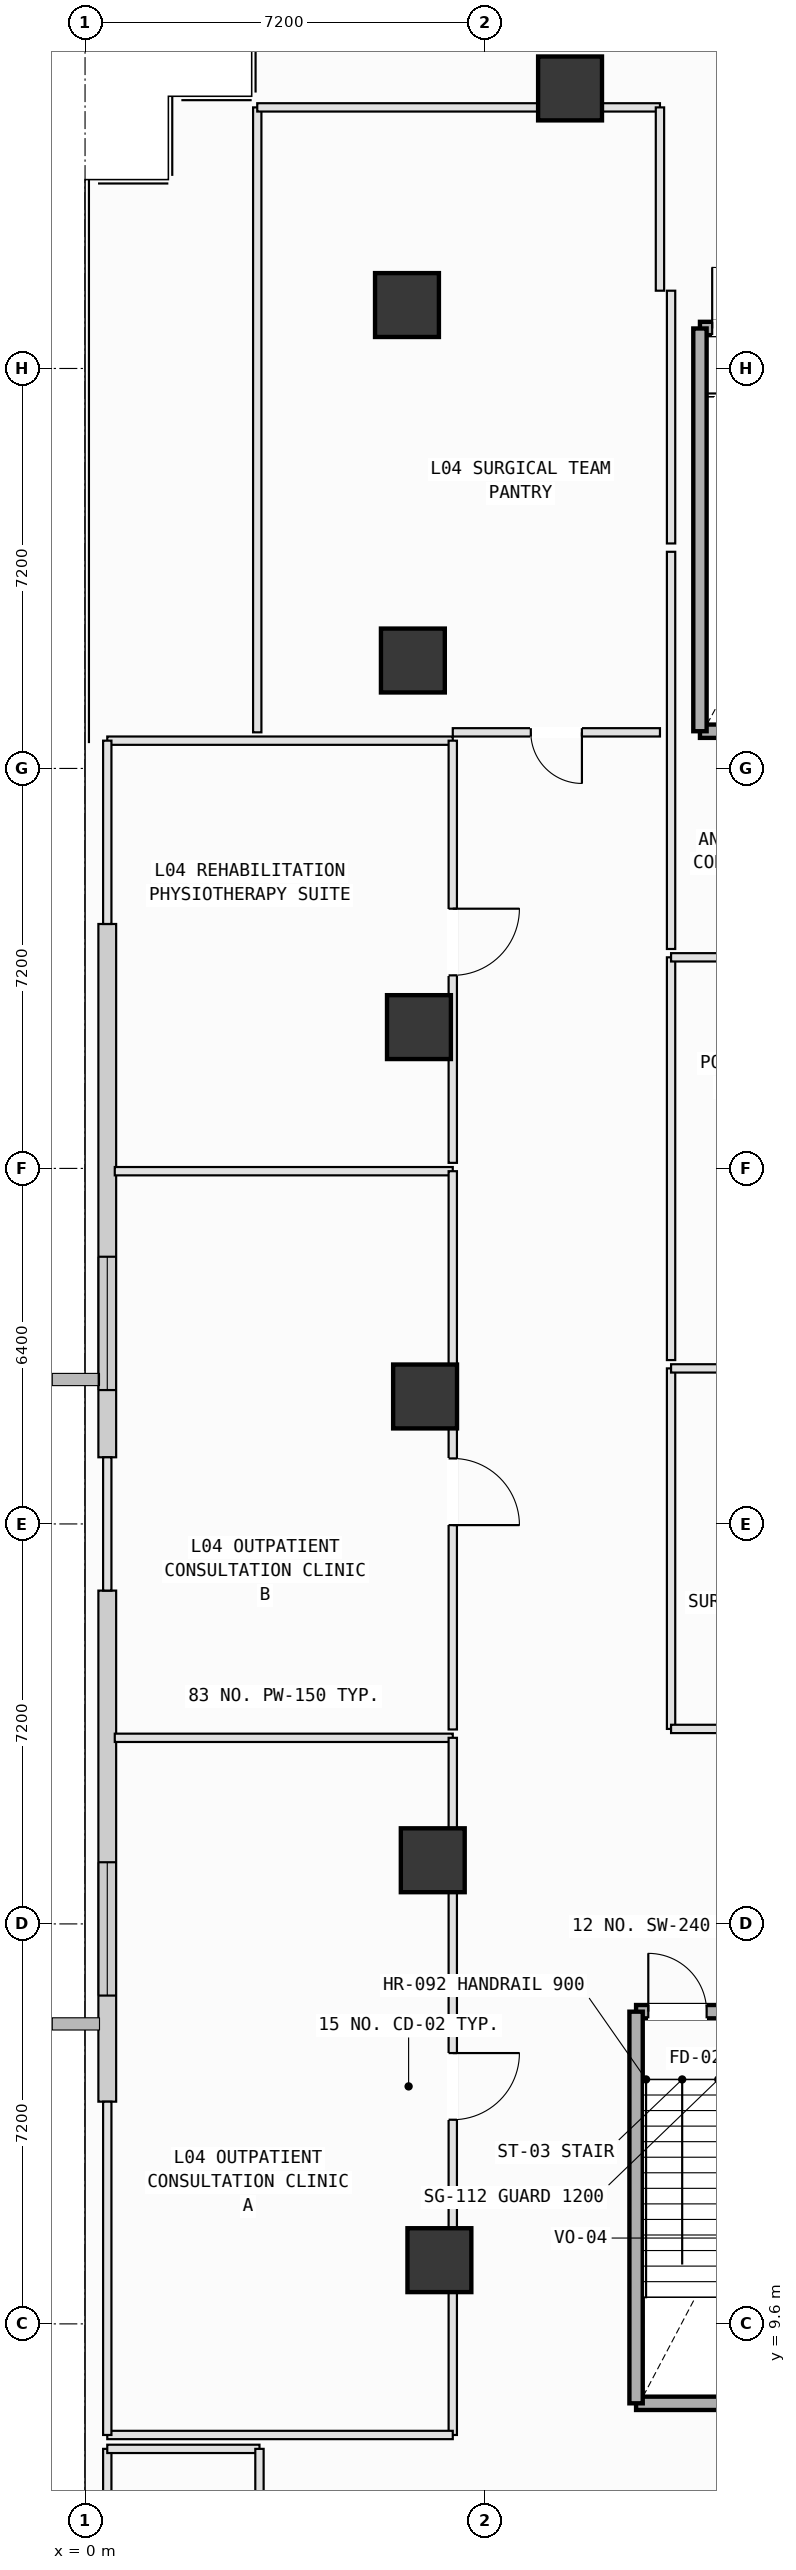
"""IFC4 building model, lengths in metres.
Left out: names, types, materials, properties, quantities, classifications, styles, units other than length and angle.
Written with IfcOpenShell. Run it as: python <this file> out.ifc"""

import sys

from ifc_helpers import new_model, si_unit, direction, frame, frame_2d, origin, origin_2d, place, context, subcontext, project, spatial, rectangle, extrude, element, fill, save


model = new_model("IFC4")
c1 = context("Model", 3, precision=1e-05, world=origin(), true_north=direction((0.0, 1.0)))
c2 = subcontext(c1, "Body", "Model", "MODEL_VIEW")
j1 = project(units=[si_unit("LENGTHUNIT", "METRE"), si_unit("PLANEANGLEUNIT", "RADIAN")], contexts=[c1])
p1 = place(None, origin())
s1 = spatial("IfcSite", under=j1, at=p1, CompositionType="ELEMENT")
p2 = place(p1, origin())
s2 = spatial("IfcBuilding", under=s1, at=p2, CompositionType="ELEMENT")
p3 = place(p2, frame((0.0, 0.0, 21.6)))
s3 = spatial("IfcBuildingStorey", under=s2, at=p3, CompositionType="ELEMENT", Elevation=21.6)
for number, where, z_axis, x_axis in (
    (1, (8.731, 49.841, 0.0), (0.0, 0.0, 1.0), (1.0, 0.0, 0.0)),
    (2, (5.796, 45.942, 0.0), (0.0, 0.0, 1.0), (1.0, 0.0, 0.0)),
    (3, (5.902, 39.543, 0.0), (0.0, 0.0, 1.0), (1.0, 0.0, 0.0)),
    (4, (6.011, 32.944, 0.0), (0.0, 0.0, 1.0), (1.0, 0.0, 0.0)),
    (5, (6.121, 26.295, 0.0), (0.0, 0.0, 1.0), (1.0, 0.0, 0.0)),
    (6, (6.26, 17.946, 0.0), (0.0, 0.0, 1.0), (1.0, 0.0, 0.0)),
    (7, (6.379, 10.747, 0.0), (0.0, 0.0, 1.0), (1.0, 0.0, 0.0)),
):
    element("IfcColumn", number, at=place(p3, frame(where, z_axis=z_axis, x_axis=x_axis)), inside=s3, PredefinedType="COLUMN", context=c2, shape_type="SweptSolid", body=[
        extrude(rectangle(XDim=1.15, YDim=1.15, at=origin_2d()), origin(), (0.0, 0.0, 1.0), 5.4),
    ])
p4 = place(p3, frame((0.4, 13.6, 0.0), z_axis=(0.0, 0.0, 1.0), x_axis=(0.0, 1.0, 0.0)))
e8 = element("IfcWall", 8, at=p4, inside=s3, PredefinedType="SOLIDWALL", context=c2, shape_type="SweptSolid", body=[
    extrude(rectangle(XDim=9.2, YDim=0.32, at=frame_2d((4.6, 0.0))), origin(), (0.0, 0.0, 1.0), 4.18),
])
p5 = place(p4, frame((1.91, 0.0, 0.8)))
e9 = element("IfcOpeningElement", 9, at=p5, cuts=e8, PredefinedType="OPENING", context=c2, shape_type="SweptSolid", body=[
    extrude(rectangle(XDim=2.4, YDim=2.2, at=frame_2d((1.2, 1.1))), frame((0.0, 0.17, 0.0), z_axis=(0.0, -1.0, 0.0), x_axis=(1.0, 0.0, 0.0)), (0.0, 0.0, 1.0), 0.34),
])
p6 = place(p3, frame((0.4, 25.2, 0.0), z_axis=(0.0, 0.0, 1.0), x_axis=(0.0, 1.0, 0.0)))
e10 = element("IfcWall", 10, at=p6, inside=s3, PredefinedType="SOLIDWALL", context=c2, shape_type="SweptSolid", body=[
    extrude(rectangle(XDim=9.6, YDim=0.32, at=frame_2d((4.8, 0.0))), origin(), (0.0, 0.0, 1.0), 4.18),
])
p7 = place(p6, frame((1.21, 0.0, 0.8)))
e11 = element("IfcOpeningElement", 11, at=p7, cuts=e10, PredefinedType="OPENING", context=c2, shape_type="SweptSolid", body=[
    extrude(rectangle(XDim=2.4, YDim=2.2, at=frame_2d((1.2, 1.1))), frame((0.0, 0.17, 0.0), z_axis=(0.0, -1.0, 0.0), x_axis=(1.0, 0.0, 0.0)), (0.0, 0.0, 1.0), 0.34),
])
p8 = place(p3, frame((9.92, 15.22, 0.0), z_axis=(0.0, 0.0, 1.0), x_axis=(1.0, 0.0, 0.0)))
e12 = element("IfcWall", 12, at=p8, inside=s3, PredefinedType="SOLIDWALL", context=c2, shape_type="SweptSolid", body=[
    extrude(rectangle(XDim=3.26, YDim=0.24, at=frame_2d((1.63, 0.0))), origin(), (0.0, 0.0, 1.0), 5.1),
])
p9 = place(p8, frame((0.22, 0.0, 0.0)))
e13 = element("IfcOpeningElement", 13, at=p9, cuts=e12, PredefinedType="OPENING", context=c2, shape_type="SweptSolid", body=[
    extrude(rectangle(XDim=1.05, YDim=2.15, at=frame_2d((0.525, 1.075))), frame((0.0, 0.13, 0.0), z_axis=(0.0, -1.0, 0.0), x_axis=(1.0, 0.0, 0.0)), (0.0, 0.0, 1.0), 0.26),
])
p10 = place(p3, frame((13.18, 8.17, 0.0), z_axis=(0.0, 0.0, 1.0), x_axis=(-1.0, 0.0, 0.0)))
e14 = element("IfcWall", 14, at=p10, inside=s3, PredefinedType="SOLIDWALL", context=c2, shape_type="SweptSolid", body=[
    extrude(rectangle(XDim=3.26, YDim=0.24, at=frame_2d((1.63, 0.0))), origin(), (0.0, 0.0, 1.0), 5.1),
])
p11 = place(p3, frame((9.92, 8.17, 0.0), z_axis=(0.0, 0.0, 1.0), x_axis=(0.0, 1.0, 0.0)))
e15 = element("IfcWall", 15, at=p11, inside=s3, PredefinedType="SOLIDWALL", context=c2, shape_type="SweptSolid", body=[
    extrude(rectangle(XDim=7.05, YDim=0.24, at=frame_2d((3.525, 0.0))), origin(), (0.0, 0.0, 1.0), 5.1),
])
p12 = place(p3, frame((11.07, 45.52, 0.0), z_axis=(0.0, 0.0, 1.0), x_axis=(1.0, 0.0, 0.0)))
e16 = element("IfcWall", 16, at=p12, inside=s3, PredefinedType="SOLIDWALL", context=c2, shape_type="SweptSolid", body=[
    extrude(rectangle(XDim=3.46, YDim=0.24, at=frame_2d((1.73, 0.0))), origin(), (0.0, 0.0, 1.0), 5.1),
])
p13 = place(p12, frame((0.22, 0.0, 0.0)))
e17 = element("IfcOpeningElement", 17, at=p13, cuts=e16, PredefinedType="OPENING", context=c2, shape_type="SweptSolid", body=[
    extrude(rectangle(XDim=1.1, YDim=2.15, at=frame_2d((0.55, 1.075))), frame((0.0, 0.13, 0.0), z_axis=(0.0, -1.0, 0.0), x_axis=(1.0, 0.0, 0.0)), (0.0, 0.0, 1.0), 0.26),
])
p14 = place(p3, frame((14.53, 38.27, 0.0), z_axis=(0.0, 0.0, 1.0), x_axis=(-1.0, 0.0, 0.0)))
e18 = element("IfcWall", 18, at=p14, inside=s3, PredefinedType="SOLIDWALL", context=c2, shape_type="SweptSolid", body=[
    extrude(rectangle(XDim=3.46, YDim=0.24, at=frame_2d((1.73, 0.0))), origin(), (0.0, 0.0, 1.0), 5.1),
])
p15 = place(p3, frame((11.07, 38.27, 0.0), z_axis=(0.0, 0.0, 1.0), x_axis=(0.0, 1.0, 0.0)))
e19 = element("IfcWall", 19, at=p15, inside=s3, PredefinedType="SOLIDWALL", context=c2, shape_type="SweptSolid", body=[
    extrude(rectangle(XDim=7.25, YDim=0.24, at=frame_2d((3.625, 0.0))), origin(), (0.0, 0.0, 1.0), 5.1),
])
p16 = place(p3, frame((0.535, 20.15, 0.0), z_axis=(0.0, 0.0, 1.0), x_axis=(1.0, 0.0, 0.0)))
e20 = element("IfcWall", 20, at=p16, inside=s3, PredefinedType="PARTITIONING", context=c2, shape_type="SweptSolid", body=[
    extrude(rectangle(XDim=6.085, YDim=0.15, at=frame_2d((3.042, 0.0))), origin(), (0.0, 0.0, 1.0), 5.1),
])
p17 = place(p3, frame((6.62, 20.15, 0.0), z_axis=(0.0, 0.0, 1.0), x_axis=(0.0, -1.0, 0.0)))
e21 = element("IfcWall", 21, at=p17, inside=s3, PredefinedType="PARTITIONING", context=c2, shape_type="SweptSolid", body=[
    extrude(rectangle(XDim=12.55, YDim=0.15, at=frame_2d((6.275, 0.0))), origin(), (0.0, 0.0, 1.0), 2.685),
])
p18 = place(p17, frame((5.675, 0.0, 0.0)))
e22 = element("IfcOpeningElement", 22, at=p18, cuts=e21, PredefinedType="OPENING", context=c2, shape_type="SweptSolid", body=[
    extrude(rectangle(XDim=1.2, YDim=2.15, at=frame_2d((0.6, 1.075))), frame((0.0, 0.085, 0.0), z_axis=(0.0, -1.0, 0.0), x_axis=(1.0, 0.0, 0.0)), (0.0, 0.0, 1.0), 0.17),
])
p19 = place(p3, frame((6.62, 7.6, 0.0), z_axis=(0.0, 0.0, 1.0), x_axis=(-1.0, 0.0, 0.0)))
e23 = element("IfcWall", 23, at=p19, inside=s3, PredefinedType="PARTITIONING", context=c2, shape_type="SweptSolid", body=[
    extrude(rectangle(XDim=6.22, YDim=0.15, at=frame_2d((3.11, 0.0))), origin(), (0.0, 0.0, 1.0), 5.1),
])
p20 = place(p3, frame((0.4, 7.6, 0.0), z_axis=(0.0, 0.0, 1.0), x_axis=(0.0, 1.0, 0.0)))
e24 = element("IfcWall", 24, at=p20, inside=s3, PredefinedType="PARTITIONING", context=c2, shape_type="SweptSolid", body=[
    extrude(rectangle(XDim=6.0, YDim=0.15, at=frame_2d((3.0, 0.0))), origin(), (0.0, 0.0, 1.0), 5.1),
])
p21 = place(p3, frame((0.535, 30.35, 0.0), z_axis=(0.0, 0.0, 1.0), x_axis=(1.0, 0.0, 0.0)))
e25 = element("IfcWall", 25, at=p21, inside=s3, PredefinedType="PARTITIONING", context=c2, shape_type="SweptSolid", body=[
    extrude(rectangle(XDim=6.085, YDim=0.15, at=frame_2d((3.042, 0.0))), origin(), (0.0, 0.0, 1.0), 5.1),
])
p22 = place(p3, frame((6.62, 30.35, 0.0), z_axis=(0.0, 0.0, 1.0), x_axis=(0.0, -1.0, 0.0)))
e26 = element("IfcWall", 26, at=p22, inside=s3, PredefinedType="PARTITIONING", context=c2, shape_type="SweptSolid", body=[
    extrude(rectangle(XDim=10.05, YDim=0.15, at=frame_2d((5.025, 0.0))), origin(), (0.0, 0.0, 1.0), 2.685),
])
p23 = place(p22, frame((5.171, 0.0, 0.0)))
e27 = element("IfcOpeningElement", 27, at=p23, cuts=e26, PredefinedType="OPENING", context=c2, shape_type="SweptSolid", body=[
    extrude(rectangle(XDim=1.2, YDim=2.15, at=frame_2d((0.6, 1.075))), frame((0.0, 0.085, 0.0), z_axis=(0.0, -1.0, 0.0), x_axis=(1.0, 0.0, 0.0)), (0.0, 0.0, 1.0), 0.17),
])
p24 = place(p3, frame((0.4, 22.8, 0.0), z_axis=(0.0, 0.0, 1.0), x_axis=(0.0, 1.0, 0.0)))
e28 = element("IfcWall", 28, at=p24, inside=s3, PredefinedType="PARTITIONING", context=c2, shape_type="SweptSolid", body=[
    extrude(rectangle(XDim=2.4, YDim=0.15, at=frame_2d((1.2, 0.0))), origin(), (0.0, 0.0, 1.0), 5.1),
])
p25 = place(p3, frame((0.4, 38.1, 0.0), z_axis=(0.0, 0.0, 1.0), x_axis=(1.0, 0.0, 0.0)))
e29 = element("IfcWall", 29, at=p25, inside=s3, PredefinedType="PARTITIONING", context=c2, shape_type="SweptSolid", body=[
    extrude(rectangle(XDim=6.22, YDim=0.15, at=frame_2d((3.11, 0.0))), origin(), (0.0, 0.0, 1.0), 5.1),
])
p26 = place(p3, frame((6.62, 38.1, 0.0), z_axis=(0.0, 0.0, 1.0), x_axis=(0.0, -1.0, 0.0)))
e30 = element("IfcWall", 30, at=p26, inside=s3, PredefinedType="PARTITIONING", context=c2, shape_type="SweptSolid", body=[
    extrude(rectangle(XDim=7.6, YDim=0.15, at=frame_2d((3.8, 0.0))), origin(), (0.0, 0.0, 1.0), 2.685),
])
p27 = place(p26, frame((3.025, 0.0, 0.0)))
e31 = element("IfcOpeningElement", 31, at=p27, cuts=e30, PredefinedType="OPENING", context=c2, shape_type="SweptSolid", body=[
    extrude(rectangle(XDim=1.2, YDim=2.15, at=frame_2d((0.6, 1.075))), frame((0.0, 0.085, 0.0), z_axis=(0.0, -1.0, 0.0), x_axis=(1.0, 0.0, 0.0)), (0.0, 0.0, 1.0), 0.17),
])
p28 = place(p3, frame((0.4, 34.8, 0.0), z_axis=(0.0, 0.0, 1.0), x_axis=(0.0, 1.0, 0.0)))
e32 = element("IfcWall", 32, at=p28, inside=s3, PredefinedType="PARTITIONING", context=c2, shape_type="SweptSolid", body=[
    extrude(rectangle(XDim=3.3, YDim=0.15, at=frame_2d((1.65, 0.0))), origin(), (0.0, 0.0, 1.0), 5.1),
])
p29 = place(p3, frame((0.4, 3.0, 0.0), z_axis=(0.0, 0.0, 1.0), x_axis=(0.0, 1.0, 0.0)))
e33 = element("IfcWall", 33, at=p29, inside=s3, PredefinedType="PARTITIONING", context=c2, shape_type="SweptSolid", body=[
    extrude(rectangle(XDim=4.35, YDim=0.15, at=frame_2d((2.175, 0.0))), origin(), (0.0, 0.0, 1.0), 5.1),
])
p30 = place(p3, frame((0.4, 7.35, 0.0), z_axis=(0.0, 0.0, 1.0), x_axis=(1.0, 0.0, 0.0)))
e34 = element("IfcWall", 34, at=p30, inside=s3, PredefinedType="PARTITIONING", context=c2, shape_type="SweptSolid", body=[
    extrude(rectangle(XDim=2.74, YDim=0.15, at=frame_2d((1.37, 0.0))), origin(), (0.0, 0.0, 1.0), 5.1),
])
p31 = place(p3, frame((3.14, 7.35, 0.0), z_axis=(0.0, 0.0, 1.0), x_axis=(0.0, -1.0, 0.0)))
e35 = element("IfcWall", 35, at=p31, inside=s3, PredefinedType="PARTITIONING", context=c2, shape_type="SweptSolid", body=[
    extrude(rectangle(XDim=2.256, YDim=0.15, at=frame_2d((1.128, 0.0))), origin(), (0.0, 0.0, 1.0), 5.1),
])
p32 = place(p3, frame((10.55, 20.31, 0.0), z_axis=(0.0, 0.0, 1.0), x_axis=(0.0, 1.0, 0.0)))
e36 = element("IfcWall", 36, at=p32, inside=s3, PredefinedType="PARTITIONING", context=c2, shape_type="SweptSolid", body=[
    extrude(rectangle(XDim=6.49, YDim=0.15, at=frame_2d((3.245, 0.0))), origin(), (0.0, 0.0, 1.0), 5.1),
])
for number, where, z_axis, x_axis in (
    (37, (10.55, 26.8, 0.0), (0.0, 0.0, 1.0), (1.0, 0.0, 0.0)),
    (38, (15.14, 20.31, 0.0), (0.0, 0.0, 1.0), (-1.0, 0.0, 0.0)),
):
    element("IfcWall", number, at=place(p3, frame(where, z_axis=z_axis, x_axis=x_axis)), inside=s3, PredefinedType="PARTITIONING", context=c2, shape_type="SweptSolid", body=[
        extrude(rectangle(XDim=4.59, YDim=0.15, at=frame_2d((2.295, 0.0))), origin(), (0.0, 0.0, 1.0), 5.1),
    ])
p33 = place(p3, frame((10.55, 26.95, 0.0), z_axis=(0.0, 0.0, 1.0), x_axis=(0.0, 1.0, 0.0)))
e39 = element("IfcWall", 39, at=p33, inside=s3, PredefinedType="PARTITIONING", context=c2, shape_type="SweptSolid", body=[
    extrude(rectangle(XDim=7.25, YDim=0.15, at=frame_2d((3.625, 0.0))), origin(), (0.0, 0.0, 1.0), 5.1),
])
p34 = place(p3, frame((10.55, 34.2, 0.0), z_axis=(0.0, 0.0, 1.0), x_axis=(1.0, 0.0, 0.0)))
e40 = element("IfcWall", 40, at=p34, inside=s3, PredefinedType="PARTITIONING", context=c2, shape_type="SweptSolid", body=[
    extrude(rectangle(XDim=4.59, YDim=0.15, at=frame_2d((2.295, 0.0))), origin(), (0.0, 0.0, 1.0), 5.1),
])
p35 = place(p3, frame((10.55, 34.35, 0.0), z_axis=(0.0, 0.0, 1.0), x_axis=(0.0, 1.0, 0.0)))
e41 = element("IfcWall", 41, at=p35, inside=s3, PredefinedType="PARTITIONING", context=c2, shape_type="SweptSolid", body=[
    extrude(rectangle(XDim=7.15, YDim=0.15, at=frame_2d((3.575, 0.0))), origin(), (0.0, 0.0, 1.0), 5.1),
])
p36 = place(p3, frame((10.55, 41.65, 0.0), z_axis=(0.0, 0.0, 1.0), x_axis=(0.0, 1.0, 0.0)))
e42 = element("IfcWall", 42, at=p36, inside=s3, PredefinedType="PARTITIONING", context=c2, shape_type="SweptSolid", body=[
    extrude(rectangle(XDim=4.55, YDim=0.15, at=frame_2d((2.275, 0.0))), origin(), (0.0, 0.0, 1.0), 5.1),
])
p37 = place(p3, frame((10.35, 38.25, 0.0), z_axis=(0.0, 0.0, 1.0), x_axis=(-1.0, 0.0, 0.0)))
e43 = element("IfcWall", 43, at=p37, inside=s3, PredefinedType="PARTITIONING", context=c2, shape_type="SweptSolid", body=[
    extrude(rectangle(XDim=3.73, YDim=0.15, at=frame_2d((1.865, 0.0))), origin(), (0.0, 0.0, 1.0), 5.1),
])
p38 = place(p37, frame((1.405, 0.0, 0.0)))
e44 = element("IfcOpeningElement", 44, at=p38, cuts=e43, PredefinedType="OPENING", context=c2, shape_type="SweptSolid", body=[
    extrude(rectangle(XDim=0.92, YDim=2.1, at=frame_2d((0.46, 1.05))), frame((0.0, 0.085, 0.0), z_axis=(0.0, -1.0, 0.0), x_axis=(1.0, 0.0, 0.0)), (0.0, 0.0, 1.0), 0.17),
])
p39 = place(p3, frame((3.1, 38.25, 0.0), z_axis=(0.0, 0.0, 1.0), x_axis=(0.0, 1.0, 0.0)))
e45 = element("IfcWall", 45, at=p39, inside=s3, PredefinedType="PARTITIONING", context=c2, shape_type="SweptSolid", body=[
    extrude(rectangle(XDim=11.25, YDim=0.15, at=frame_2d((5.625, 0.0))), origin(), (0.0, 0.0, 1.0), 5.1),
])
p40 = place(p3, frame((3.1, 49.5, 0.0), z_axis=(0.0, 0.0, 1.0), x_axis=(1.0, 0.0, 0.0)))
e46 = element("IfcWall", 46, at=p40, inside=s3, PredefinedType="PARTITIONING", context=c2, shape_type="SweptSolid", body=[
    extrude(rectangle(XDim=7.25, YDim=0.15, at=frame_2d((3.625, 0.0))), origin(), (0.0, 0.0, 1.0), 2.685),
])
p41 = place(p3, frame((10.35, 49.5, 0.0), z_axis=(0.0, 0.0, 1.0), x_axis=(0.0, -1.0, 0.0)))
e47 = element("IfcWall", 47, at=p41, inside=s3, PredefinedType="PARTITIONING", context=c2, shape_type="SweptSolid", body=[
    extrude(rectangle(XDim=3.3, YDim=0.15, at=frame_2d((1.65, 0.0))), origin(), (0.0, 0.0, 1.0), 5.1),
])
p42 = place(p5, origin())
e48 = element("IfcWindow", 48, at=p42, inside=s3, PartitioningType="SINGLE_PANEL", PredefinedType="WINDOW", context=c2, shape_type="SweptSolid", body=[
    extrude(rectangle(XDim=2.4, YDim=2.2, at=frame_2d((1.2, 1.1))), frame((0.0, 0.03, 0.0), z_axis=(0.0, -1.0, 0.0), x_axis=(1.0, 0.0, 0.0)), (0.0, 0.0, 1.0), 0.06),
])
fill(e9, e48)
p43 = place(p7, origin())
e49 = element("IfcWindow", 49, at=p43, inside=s3, PartitioningType="SINGLE_PANEL", PredefinedType="WINDOW", context=c2, shape_type="SweptSolid", body=[
    extrude(rectangle(XDim=2.4, YDim=2.2, at=frame_2d((1.2, 1.1))), frame((0.0, 0.03, 0.0), z_axis=(0.0, -1.0, 0.0), x_axis=(1.0, 0.0, 0.0)), (0.0, 0.0, 1.0), 0.06),
])
fill(e11, e49)
p44 = place(p9, origin())
e50 = element("IfcDoor", 50, at=p44, inside=s3, OperationType="SINGLE_SWING_LEFT", PredefinedType="DOOR", context=c2, shape_type="SweptSolid", body=[
    extrude(rectangle(XDim=1.05, YDim=2.15, at=frame_2d((0.525, 1.075))), frame((0.0, 0.025, 0.0), z_axis=(0.0, -1.0, 0.0), x_axis=(1.0, 0.0, 0.0)), (0.0, 0.0, 1.0), 0.05),
])
fill(e13, e50)
p45 = place(p13, origin())
e51 = element("IfcDoor", 51, at=p45, inside=s3, OperationType="SINGLE_SWING_LEFT", PredefinedType="DOOR", context=c2, shape_type="SweptSolid", body=[
    extrude(rectangle(XDim=1.1, YDim=2.15, at=frame_2d((0.55, 1.075))), frame((0.0, 0.025, 0.0), z_axis=(0.0, -1.0, 0.0), x_axis=(1.0, 0.0, 0.0)), (0.0, 0.0, 1.0), 0.05),
])
fill(e17, e51)
p46 = place(p18, origin())
e52 = element("IfcDoor", 52, at=p46, inside=s3, OperationType="SINGLE_SWING_LEFT", PredefinedType="DOOR", context=c2, shape_type="SweptSolid", body=[
    extrude(rectangle(XDim=1.2, YDim=2.15, at=frame_2d((0.6, 1.075))), frame((0.0, 0.025, 0.0), z_axis=(0.0, -1.0, 0.0), x_axis=(1.0, 0.0, 0.0)), (0.0, 0.0, 1.0), 0.05),
])
fill(e22, e52)
p47 = place(p23, origin())
e53 = element("IfcDoor", 53, at=p47, inside=s3, OperationType="SINGLE_SWING_RIGHT", PredefinedType="DOOR", context=c2, shape_type="SweptSolid", body=[
    extrude(rectangle(XDim=1.2, YDim=2.15, at=frame_2d((0.6, 1.075))), frame((0.0, 0.025, 0.0), z_axis=(0.0, -1.0, 0.0), x_axis=(1.0, 0.0, 0.0)), (0.0, 0.0, 1.0), 0.05),
])
fill(e27, e53)
p48 = place(p27, origin())
e54 = element("IfcDoor", 54, at=p48, inside=s3, OperationType="SINGLE_SWING_LEFT", PredefinedType="DOOR", context=c2, shape_type="SweptSolid", body=[
    extrude(rectangle(XDim=1.2, YDim=2.15, at=frame_2d((0.6, 1.075))), frame((0.0, 0.025, 0.0), z_axis=(0.0, -1.0, 0.0), x_axis=(1.0, 0.0, 0.0)), (0.0, 0.0, 1.0), 0.05),
])
fill(e31, e54)
p49 = place(p38, origin())
e55 = element("IfcDoor", 55, at=p49, inside=s3, OperationType="SINGLE_SWING_LEFT", PredefinedType="DOOR", context=c2, shape_type="SweptSolid", body=[
    extrude(rectangle(XDim=0.92, YDim=2.1, at=frame_2d((0.46, 1.05))), frame((0.0, 0.025, 0.0), z_axis=(0.0, -1.0, 0.0), x_axis=(1.0, 0.0, 0.0)), (0.0, 0.0, 1.0), 0.05),
])
fill(e44, e55)
save(model, sys.argv[1])
